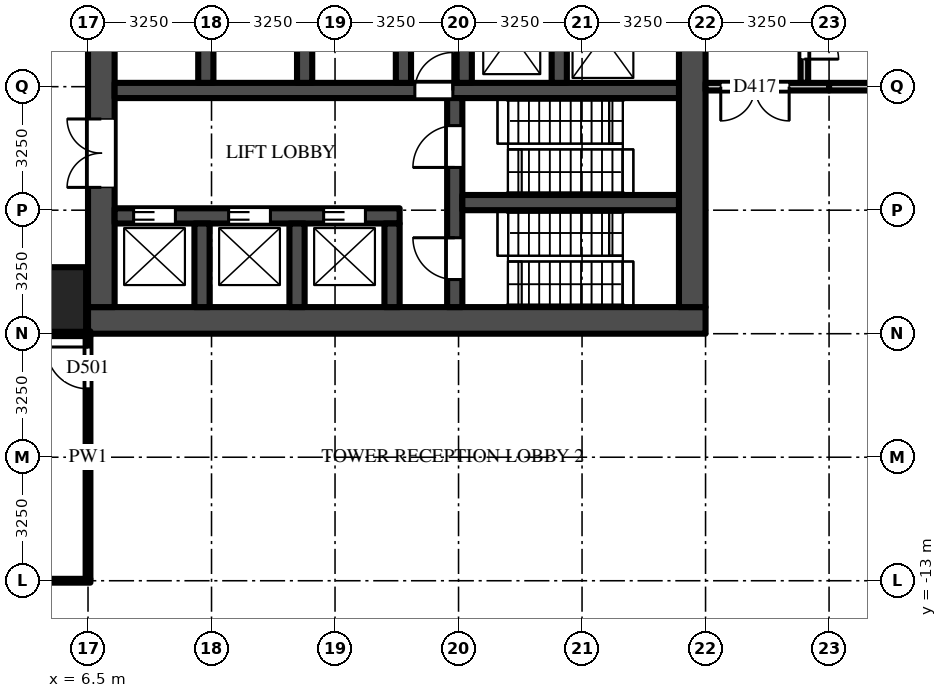
"""IFC4 building model, lengths in metres.
Left out: names, types, materials, properties, quantities, classifications, styles, units other than length and angle.
Written with IfcOpenShell. Run it as: python <this file> out.ifc"""

import sys

from ifc_helpers import new_model, si_unit, direction, frame, frame_2d, origin, origin_2d, place, context, subcontext, project, spatial, rectangle, extrude, source, transform, mapped, element, fill, save


model = new_model("IFC4")
c1 = context("Model", 3, precision=1e-05, world=origin(), true_north=direction((0.0, 1.0)))
c2 = subcontext(c1, "Body", "Model", "MODEL_VIEW")
j1 = project(units=[si_unit("LENGTHUNIT", "METRE"), si_unit("PLANEANGLEUNIT", "RADIAN")], contexts=[c1])
p1 = place(None, origin())
s1 = spatial("IfcSite", under=j1, at=p1, CompositionType="ELEMENT")
p2 = place(p1, origin())
s2 = spatial("IfcBuilding", under=s1, at=p2, CompositionType="ELEMENT")
p3 = place(p2, origin())
s3 = spatial("IfcBuildingStorey", under=s2, at=p3, CompositionType="ELEMENT", Elevation=0.0)
m1 = source(origin(), c2, "Body", "SweptSolid", [
    extrude(rectangle(XDim=1.7, YDim=1.7, at=origin_2d()), origin(), (0.0, 0.0, 1.0), 8.5),
])
p4 = place(p3, frame((5.6, -5.6, -0.5), z_axis=(0.0, 0.0, 1.0), x_axis=(1.0, 0.0, 0.0)))
e1 = element("IfcColumn", 1, at=p4, inside=s3, PredefinedType="COLUMN", context=c2, shape_type="MappedRepresentation", body=[
    mapped(m1, transform((0.0, 0.0, 0.0))),
])
p5 = place(p3, frame((6.5, -6.15, 0.0), z_axis=(0.0, 0.0, 1.0), x_axis=(1.0, 0.0, 0.0)))
e2 = element("IfcWall", 2, at=p5, inside=s3, PredefinedType="SHEAR", context=c2, shape_type="SweptSolid", body=[
    extrude(rectangle(XDim=16.25, YDim=0.7, at=frame_2d((8.125, 0.0))), origin(), (0.0, 0.0, 1.0), 7.7),
])
p6 = place(p3, frame((6.85, -5.8, 0.0), z_axis=(0.0, 0.0, 1.0), x_axis=(0.0, 1.0, 0.0)))
e3 = element("IfcWall", 3, at=p6, inside=s3, PredefinedType="SHEAR", context=c2, shape_type="SweptSolid", body=[
    extrude(rectangle(XDim=9.05, YDim=0.7, at=frame_2d((4.525, 0.0))), origin(), (0.0, 0.0, 1.0), 7.7),
])
m2 = source(origin(), c2, "Body", "SweptSolid", [
    extrude(rectangle(XDim=1.8, YDim=2.1, at=frame_2d((0.9, 1.05))), frame((0.0, 0.36, 0.0), z_axis=(0.0, -1.0, 0.0), x_axis=(1.0, 0.0, 0.0)), (0.0, 0.0, 1.0), 0.72),
])
p7 = place(p6, frame((3.15, 0.0, 0.0)))
e4 = element("IfcOpeningElement", 4, at=p7, cuts=e3, PredefinedType="OPENING", context=c2, shape_type="MappedRepresentation", body=[
    mapped(m2, transform((0.0, 0.0, 0.0))),
])
m3 = source(origin(), c2, "Body", "SweptSolid", [
    extrude(rectangle(XDim=9.05, YDim=0.7, at=frame_2d((4.525, 0.0))), origin(), (0.0, 0.0, 1.0), 7.7),
])
p8 = place(p3, frame((22.4, -5.8, 0.0), z_axis=(0.0, 0.0, 1.0), x_axis=(0.0, 1.0, 0.0)))
e5 = element("IfcWall", 5, at=p8, inside=s3, PredefinedType="SHEAR", context=c2, shape_type="MappedRepresentation", body=[
    mapped(m3, transform((0.0, 0.0, 0.0))),
])
p9 = place(p3, frame((7.2, -3.4, 0.0), z_axis=(0.0, 0.0, 1.0), x_axis=(1.0, 0.0, 0.0)))
e6 = element("IfcWall", 6, at=p9, inside=s3, PredefinedType="SHEAR", context=c2, shape_type="SweptSolid", body=[
    extrude(rectangle(XDim=7.5, YDim=0.4, at=frame_2d((3.75, 0.0))), origin(), (0.0, 0.0, 1.0), 7.7),
])
m4 = source(origin(), c2, "Body", "SweptSolid", [
    extrude(rectangle(XDim=1.1, YDim=2.1, at=frame_2d((0.55, 1.05))), frame((0.0, 0.21, 0.0), z_axis=(0.0, -1.0, 0.0), x_axis=(1.0, 0.0, 0.0)), (0.0, 0.0, 1.0), 0.42),
])
p10 = place(p9, frame((0.5, 0.0, 0.0)))
e7 = element("IfcOpeningElement", 7, at=p10, cuts=e6, PredefinedType="OPENING", context=c2, shape_type="MappedRepresentation", body=[
    mapped(m4, transform((0.0, 0.0, 0.0))),
])
p11 = place(p9, frame((3.0, 0.0, 0.0)))
e8 = element("IfcOpeningElement", 8, at=p11, cuts=e6, PredefinedType="OPENING", context=c2, shape_type="MappedRepresentation", body=[
    mapped(m4, transform((0.0, 0.0, 0.0))),
])
p12 = place(p9, frame((5.5, 0.0, 0.0)))
e9 = element("IfcOpeningElement", 9, at=p12, cuts=e6, PredefinedType="OPENING", context=c2, shape_type="MappedRepresentation", body=[
    mapped(m4, transform((0.0, 0.0, 0.0))),
])
m5 = source(origin(), c2, "Body", "SweptSolid", [
    extrude(rectangle(XDim=14.85, YDim=0.4, at=frame_2d((7.425, 0.0))), origin(), (0.0, 0.0, 1.0), 7.7),
])
p13 = place(p3, frame((7.2, -0.1, 0.0), z_axis=(0.0, 0.0, 1.0), x_axis=(1.0, 0.0, 0.0)))
e10 = element("IfcWall", 10, at=p13, inside=s3, PredefinedType="SHEAR", context=c2, shape_type="MappedRepresentation", body=[
    mapped(m5, transform((0.0, 0.0, 0.0))),
])
m6 = source(origin(), c2, "Body", "SweptSolid", [
    extrude(rectangle(XDim=1.0, YDim=2.1, at=frame_2d((0.5, 1.05))), frame((0.0, 0.21, 0.0), z_axis=(0.0, -1.0, 0.0), x_axis=(1.0, 0.0, 0.0)), (0.0, 0.0, 1.0), 0.42),
])
p14 = place(p13, frame((7.9, 0.0, 0.0)))
e11 = element("IfcOpeningElement", 11, at=p14, cuts=e10, PredefinedType="OPENING", context=c2, shape_type="MappedRepresentation", body=[
    mapped(m6, transform((0.0, 0.0, 0.0))),
])
m7 = source(origin(), c2, "Body", "SweptSolid", [
    extrude(rectangle(XDim=5.5, YDim=0.4, at=frame_2d((2.75, 0.0))), origin(), (0.0, 0.0, 1.0), 7.7),
])
p15 = place(p3, frame((16.15, -5.8, 0.0), z_axis=(0.0, 0.0, 1.0), x_axis=(0.0, 1.0, 0.0)))
e12 = element("IfcWall", 12, at=p15, inside=s3, PredefinedType="SHEAR", context=c2, shape_type="MappedRepresentation", body=[
    mapped(m7, transform((0.0, 0.0, 0.0))),
])
p16 = place(p15, frame((0.725, 0.0, 0.0)))
e13 = element("IfcOpeningElement", 13, at=p16, cuts=e12, PredefinedType="OPENING", context=c2, shape_type="MappedRepresentation", body=[
    mapped(m4, transform((0.0, 0.0, 0.0))),
])
p17 = place(p15, frame((3.675, 0.0, 0.0)))
e14 = element("IfcOpeningElement", 14, at=p17, cuts=e12, PredefinedType="OPENING", context=c2, shape_type="MappedRepresentation", body=[
    mapped(m4, transform((0.0, 0.0, 0.0))),
])
m8 = source(origin(), c2, "Body", "SweptSolid", [
    extrude(rectangle(XDim=5.7, YDim=0.4, at=frame_2d((2.85, 0.0))), origin(), (0.0, 0.0, 1.0), 7.7),
])
p18 = place(p3, frame((16.35, -3.05, 0.0), z_axis=(0.0, 0.0, 1.0), x_axis=(1.0, 0.0, 0.0)))
e15 = element("IfcWall", 15, at=p18, inside=s3, PredefinedType="SHEAR", context=c2, shape_type="MappedRepresentation", body=[
    mapped(m8, transform((0.0, 0.0, 0.0))),
])
m9 = source(origin(), c2, "Body", "SweptSolid", [
    extrude(rectangle(XDim=2.2, YDim=0.4, at=frame_2d((1.1, 0.0))), origin(), (0.0, 0.0, 1.0), 7.7),
])
for number, where, z_axis, x_axis in (
    (16, (9.5, -5.8, 0.0), (0.0, 0.0, 1.0), (0.0, 1.0, 0.0)),
    (17, (12.0, -5.8, 0.0), (0.0, 0.0, 1.0), (0.0, 1.0, 0.0)),
    (18, (14.5, -5.8, 0.0), (0.0, 0.0, 1.0), (0.0, 1.0, 0.0)),
):
    element("IfcWall", number, at=place(p3, frame(where, z_axis=z_axis, x_axis=x_axis)), inside=s3, PredefinedType="SHEAR", context=c2, shape_type="MappedRepresentation", body=[
        mapped(m9, transform((0.0, 0.0, 0.0))),
    ])
m10 = source(origin(), c2, "Body", "SweptSolid", [
    extrude(rectangle(XDim=2.45, YDim=0.4, at=frame_2d((1.225, 0.0))), origin(), (0.0, 0.0, 1.0), 7.7),
])
for number, where, z_axis, x_axis in (
    (19, (9.6, 0.1, 0.0), (0.0, 0.0, 1.0), (0.0, 1.0, 0.0)),
    (20, (12.2, 0.1, 0.0), (0.0, 0.0, 1.0), (0.0, 1.0, 0.0)),
    (21, (14.8, 0.1, 0.0), (0.0, 0.0, 1.0), (0.0, 1.0, 0.0)),
    (22, (16.4, 0.1, 0.0), (0.0, 0.0, 1.0), (0.0, 1.0, 0.0)),
    (23, (18.9, 0.1, 0.0), (0.0, 0.0, 1.0), (0.0, 1.0, 0.0)),
):
    element("IfcWall", number, at=place(p3, frame(where, z_axis=z_axis, x_axis=x_axis)), inside=s3, PredefinedType="SHEAR", context=c2, shape_type="MappedRepresentation", body=[
        mapped(m10, transform((0.0, 0.0, 0.0))),
    ])
p19 = place(p3, frame((6.5, -12.95, 0.0), z_axis=(0.0, 0.0, 1.0), x_axis=(0.0, 1.0, 0.0)))
e24 = element("IfcWall", 24, at=p19, inside=s3, PredefinedType="PARTITIONING", context=c2, shape_type="SweptSolid", body=[
    extrude(rectangle(XDim=6.387, YDim=0.125, at=frame_2d((3.194, 0.0))), origin(), (0.0, 0.0, 1.0), 6.997),
])
m11 = source(origin(), c2, "Body", "SweptSolid", [
    extrude(rectangle(XDim=1.1, YDim=2.1, at=frame_2d((0.55, 1.05))), frame((0.0, 0.073, 0.0), z_axis=(0.0, -1.0, 0.0), x_axis=(1.0, 0.0, 0.0)), (0.0, 0.0, 1.0), 0.145),
])
p20 = place(p19, frame((5.0, 0.0, 0.0)))
e25 = element("IfcOpeningElement", 25, at=p20, cuts=e24, PredefinedType="OPENING", context=c2, shape_type="MappedRepresentation", body=[
    mapped(m11, transform((0.0, 0.0, 0.0))),
])
m12 = source(origin(), c2, "Body", "SweptSolid", [
    extrude(rectangle(XDim=5.05, YDim=0.2, at=frame_2d((2.525, 0.0))), origin(), (0.0, 0.0, 1.0), 7.077),
])
p21 = place(p3, frame((25.35, 5.15, 0.0), z_axis=(0.0, 0.0, 1.0), x_axis=(0.0, -1.0, 0.0)))
e26 = element("IfcWall", 26, at=p21, inside=s3, PredefinedType="PARTITIONING", context=c2, shape_type="MappedRepresentation", body=[
    mapped(m12, transform((0.0, 0.0, 0.0))),
])
m13 = source(origin(), c2, "Body", "SweptSolid", [
    extrude(rectangle(XDim=1.8, YDim=2.1, at=frame_2d((0.9, 1.05))), frame((0.0, 0.11, 0.0), z_axis=(0.0, -1.0, 0.0), x_axis=(1.0, 0.0, 0.0)), (0.0, 0.0, 1.0), 0.22),
])
p22 = place(p21, frame((2.625, 0.0, 0.0)))
e27 = element("IfcOpeningElement", 27, at=p22, cuts=e26, PredefinedType="OPENING", context=c2, shape_type="MappedRepresentation", body=[
    mapped(m13, transform((0.0, 0.0, 0.0))),
])
p23 = place(p3, frame((-3.312, -13.0, 0.0), z_axis=(0.0, 0.0, 1.0), x_axis=(1.0, 0.0, 0.0)))
e28 = element("IfcWall", 28, at=p23, inside=s3, PredefinedType="PARTITIONING", context=c2, shape_type="SweptSolid", body=[
    extrude(rectangle(XDim=9.875, YDim=0.1, at=frame_2d((4.938, 0.0))), origin(), (0.0, 0.0, 1.0), 6.762),
])
p24 = place(p3, frame((6.562, -6.5, 0.0), z_axis=(0.0, 0.0, 1.0), x_axis=(-1.0, 0.0, 0.0)))
e29 = element("IfcWall", 29, at=p24, inside=s3, PredefinedType="PARTITIONING", context=c2, shape_type="SweptSolid", body=[
    extrude(rectangle(XDim=9.875, YDim=0.125, at=frame_2d((4.938, 0.0))), origin(), (0.0, 0.0, 1.0), 6.762),
])
m14 = source(origin(), c2, "Body", "SweptSolid", [
    extrude(rectangle(XDim=1.0, YDim=2.1, at=frame_2d((0.5, 1.05))), frame((0.0, 0.073, 0.0), z_axis=(0.0, -1.0, 0.0), x_axis=(1.0, 0.0, 0.0)), (0.0, 0.0, 1.0), 0.145),
])
p25 = place(p24, frame((5.212, 0.0, 0.0)))
e30 = element("IfcOpeningElement", 30, at=p25, cuts=e29, PredefinedType="OPENING", context=c2, shape_type="MappedRepresentation", body=[
    mapped(m14, transform((0.0, 0.0, 0.0))),
])
m15 = source(origin(), c2, "Body", "SweptSolid", [
    extrude(rectangle(XDim=3.25, YDim=0.2, at=frame_2d((1.625, 0.0))), origin(), (0.0, 0.0, 1.0), 7.077),
])
p26 = place(p3, frame((26.0, 0.0, 0.0), z_axis=(0.0, 0.0, 1.0), x_axis=(-1.0, 0.0, 0.0)))
e31 = element("IfcWall", 31, at=p26, inside=s3, PredefinedType="PARTITIONING", context=c2, shape_type="MappedRepresentation", body=[
    mapped(m15, transform((0.0, 0.0, 0.0))),
])
p27 = place(p26, frame((1.05, 0.0, 0.0)))
e32 = element("IfcOpeningElement", 32, at=p27, cuts=e31, PredefinedType="OPENING", context=c2, shape_type="MappedRepresentation", body=[
    mapped(m13, transform((0.0, 0.0, 0.0))),
])
m16 = source(origin(), c2, "Body", "SweptSolid", [
    extrude(rectangle(XDim=6.5, YDim=0.2, at=frame_2d((3.25, 0.0))), origin(), (0.0, 0.0, 1.0), 6.918),
])
p28 = place(p3, frame((32.5, 0.0, 0.0), z_axis=(0.0, 0.0, 1.0), x_axis=(-1.0, 0.0, 0.0)))
e33 = element("IfcWall", 33, at=p28, inside=s3, PredefinedType="PARTITIONING", context=c2, shape_type="MappedRepresentation", body=[
    mapped(m16, transform((0.0, 0.0, 0.0))),
])
m17 = source(origin(), c2, "Body", "SweptSolid", [
    extrude(rectangle(XDim=1.1, YDim=2.1, at=frame_2d((0.55, 1.05))), frame((0.0, 0.025, 0.0), z_axis=(0.0, -1.0, 0.0), x_axis=(1.0, 0.0, 0.0)), (0.0, 0.0, 1.0), 0.05),
])
p29 = place(p10, origin())
e34 = element("IfcDoor", 34, at=p29, inside=s3, OperationType="DOUBLE_DOOR_SLIDING", PredefinedType="DOOR", context=c2, shape_type="MappedRepresentation", body=[
    mapped(m17, transform((0.0, 0.0, 0.0))),
])
fill(e7, e34)
p30 = place(p11, origin())
e35 = element("IfcDoor", 35, at=p30, inside=s3, OperationType="DOUBLE_DOOR_SLIDING", PredefinedType="DOOR", context=c2, shape_type="MappedRepresentation", body=[
    mapped(m17, transform((0.0, 0.0, 0.0))),
])
fill(e8, e35)
p31 = place(p12, origin())
e36 = element("IfcDoor", 36, at=p31, inside=s3, OperationType="DOUBLE_DOOR_SLIDING", PredefinedType="DOOR", context=c2, shape_type="MappedRepresentation", body=[
    mapped(m17, transform((0.0, 0.0, 0.0))),
])
fill(e9, e36)
m18 = source(origin(), c2, "Body", "SweptSolid", [
    extrude(rectangle(XDim=1.8, YDim=2.1, at=frame_2d((0.9, 1.05))), frame((0.0, -0.275, 0.0), z_axis=(0.0, -1.0, 0.0), x_axis=(1.0, 0.0, 0.0)), (0.0, 0.0, 1.0), 0.05),
])
p32 = place(p7, origin())
e37 = element("IfcDoor", 37, at=p32, inside=s3, OperationType="DOUBLE_DOOR_SINGLE_SWING", PredefinedType="DOOR", context=c2, shape_type="MappedRepresentation", body=[
    mapped(m18, transform((0.0, 0.0, 0.0))),
])
fill(e4, e37)
p33 = place(p16, origin())
e38 = element("IfcDoor", 38, at=p33, inside=s3, OperationType="SINGLE_SWING_RIGHT", PredefinedType="DOOR", context=c2, shape_type="MappedRepresentation", body=[
    mapped(m17, transform((0.0, 0.0, 0.0))),
])
fill(e13, e38)
p34 = place(p17, origin())
e39 = element("IfcDoor", 39, at=p34, inside=s3, OperationType="SINGLE_SWING_LEFT", PredefinedType="DOOR", context=c2, shape_type="MappedRepresentation", body=[
    mapped(m17, transform((0.0, 0.0, 0.0))),
])
fill(e14, e39)
m19 = source(origin(), c2, "Body", "SweptSolid", [
    extrude(rectangle(XDim=1.0, YDim=2.1, at=frame_2d((0.5, 1.05))), frame((0.0, 0.025, 0.0), z_axis=(0.0, -1.0, 0.0), x_axis=(1.0, 0.0, 0.0)), (0.0, 0.0, 1.0), 0.05),
])
p35 = place(p14, origin())
e40 = element("IfcDoor", 40, at=p35, inside=s3, OperationType="SINGLE_SWING_RIGHT", PredefinedType="DOOR", context=c2, shape_type="MappedRepresentation", body=[
    mapped(m19, transform((0.0, 0.0, 0.0))),
])
fill(e11, e40)
p36 = place(p20, origin())
e41 = element("IfcDoor", 41, at=p36, inside=s3, OperationType="SINGLE_SWING_RIGHT", PredefinedType="DOOR", context=c2, shape_type="MappedRepresentation", body=[
    mapped(m17, transform((0.0, 0.0, 0.0))),
])
fill(e25, e41)
m20 = source(origin(), c2, "Body", "SweptSolid", [
    extrude(rectangle(XDim=1.8, YDim=2.1, at=frame_2d((0.9, 1.05))), frame((0.0, 0.025, 0.0), z_axis=(0.0, -1.0, 0.0), x_axis=(1.0, 0.0, 0.0)), (0.0, 0.0, 1.0), 0.05),
])
p37 = place(p27, origin())
e42 = element("IfcDoor", 42, at=p37, inside=s3, OperationType="DOUBLE_DOOR_SINGLE_SWING", PredefinedType="DOOR", context=c2, shape_type="MappedRepresentation", body=[
    mapped(m20, transform((0.0, 0.0, 0.0))),
])
fill(e32, e42)
p38 = place(p22, origin())
e43 = element("IfcDoor", 43, at=p38, inside=s3, OperationType="DOUBLE_DOOR_SINGLE_SWING", PredefinedType="DOOR", context=c2, shape_type="MappedRepresentation", body=[
    mapped(m20, transform((0.0, 0.0, 0.0))),
])
fill(e27, e43)
save(model, sys.argv[1])
